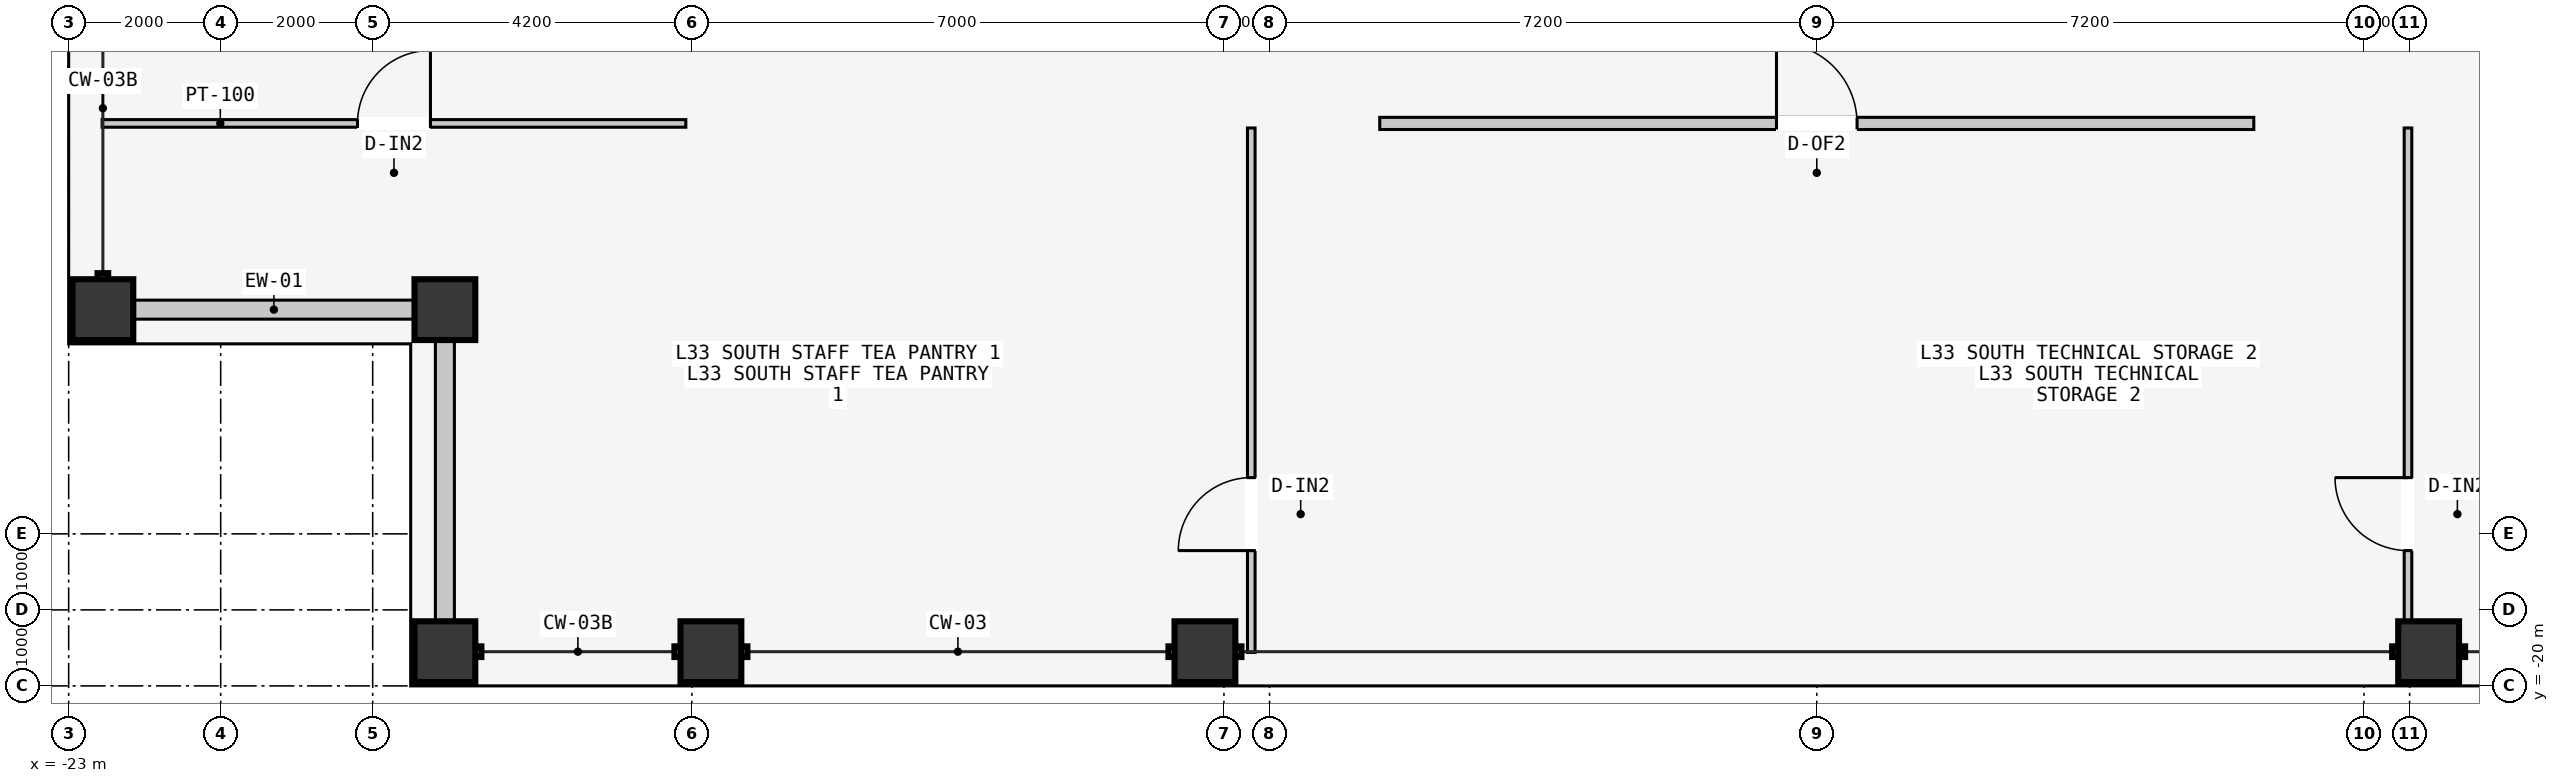
"""IFC4 building model, lengths in metres.
Left out: names, types, materials, properties, quantities, classifications, styles, units other than length and angle.
Written with IfcOpenShell. Run it as: python <this file> out.ifc"""

import sys

from ifc_helpers import new_model, si_unit, direction, frame, frame_2d, origin, origin_2d, place, context, subcontext, project, spatial, rectangle, hollow_rectangle, extrude, element, fill, save


model = new_model("IFC4")
c1 = context("Model", 3, precision=1e-05, world=origin(), true_north=direction((0.0, 1.0)))
c2 = subcontext(c1, "Body", "Model", "MODEL_VIEW")
j1 = project(units=[si_unit("LENGTHUNIT", "METRE"), si_unit("PLANEANGLEUNIT", "RADIAN")], contexts=[c1])
p1 = place(None, origin())
s1 = spatial("IfcSite", under=j1, at=p1, CompositionType="ELEMENT")
p2 = place(p1, origin())
s2 = spatial("IfcBuilding", under=s1, at=p2, CompositionType="ELEMENT")
p3 = place(p2, frame((0.0, 0.0, 127.8)))
s3 = spatial("IfcBuildingStorey", under=s2, at=p3, CompositionType="ELEMENT", Elevation=127.8)
for number, where, z_axis, x_axis in (
    (1, (-18.05, -19.55, 0.0), (0.0, 0.0, 1.0), (1.0, 0.0, 0.0)),
    (2, (-14.55, -19.55, 0.0), (0.0, 0.0, 1.0), (1.0, 0.0, 0.0)),
    (3, (-8.05, -19.55, 0.0), (0.0, 0.0, 1.0), (1.0, 0.0, 0.0)),
    (4, (8.05, -19.55, 0.0), (0.0, 0.0, 1.0), (1.0, 0.0, 0.0)),
    (5, (-22.55, -15.05, 0.0), (0.0, 0.0, 1.0), (0.0, 1.0, 0.0)),
    (6, (-18.05, -15.05, 0.0), (0.0, 0.0, 1.0), (1.0, 0.0, 0.0)),
):
    element("IfcColumn", number, at=place(p3, frame(where, z_axis=z_axis, x_axis=x_axis)), inside=s3, PredefinedType="COLUMN", context=c2, shape_type="SweptSolid", body=[
        extrude(hollow_rectangle(XDim=0.8, YDim=0.8, WallThickness=0.036, at=origin_2d()), origin(), (0.0, 0.0, 1.0), 3.6),
    ])
for number, where, z_axis, x_axis in (
    (7, (-22.14, -15.05, 0.0), (0.0, 0.0, 1.0), (1.0, 0.0, 0.0)),
    (8, (-18.05, -19.14, 0.0), (0.0, 0.0, 1.0), (0.0, 1.0, 0.0)),
):
    element("IfcWall", number, at=place(p3, frame(where, z_axis=z_axis, x_axis=x_axis)), inside=s3, PredefinedType="STANDARD", context=c2, shape_type="SweptSolid", body=[
        extrude(rectangle(XDim=3.68, YDim=0.25, at=frame_2d((1.84, 0.0))), origin(), (0.0, 0.0, 1.0), 2.75),
    ])
p4 = place(p3, frame((-7.44, -19.56, 0.0), z_axis=(0.0, 0.0, 1.0), x_axis=(0.0, 1.0, 0.0)))
e9 = element("IfcWall", 9, at=p4, inside=s3, PredefinedType="PARTITIONING", context=c2, shape_type="SweptSolid", body=[
    extrude(rectangle(XDim=6.9, YDim=0.1, at=frame_2d((3.45, 0.0))), origin(), (0.0, 0.0, 1.0), 3.4),
])
p5 = place(p4, frame((1.34, 0.0, 0.0)))
e10 = element("IfcOpeningElement", 10, at=p5, cuts=e9, PredefinedType="OPENING", context=c2, shape_type="SweptSolid", body=[
    extrude(rectangle(XDim=0.96, YDim=2.18, at=frame_2d((0.48, 1.09))), frame((0.0, 0.06, 0.0), z_axis=(0.0, -1.0, 0.0), x_axis=(1.0, 0.0, 0.0)), (0.0, 0.0, 1.0), 0.12),
])
p6 = place(p3, frame((7.779, -19.56, 0.0), z_axis=(0.0, 0.0, 1.0), x_axis=(0.0, 1.0, 0.0)))
e11 = element("IfcWall", 11, at=p6, inside=s3, PredefinedType="PARTITIONING", context=c2, shape_type="SweptSolid", body=[
    extrude(rectangle(XDim=6.9, YDim=0.1, at=frame_2d((3.45, 0.0))), origin(), (0.0, 0.0, 1.0), 3.4),
])
p7 = place(p6, frame((1.34, 0.0, 0.0)))
e12 = element("IfcOpeningElement", 12, at=p7, cuts=e11, PredefinedType="OPENING", context=c2, shape_type="SweptSolid", body=[
    extrude(rectangle(XDim=0.96, YDim=2.18, at=frame_2d((0.48, 1.09))), frame((0.0, 0.06, 0.0), z_axis=(0.0, -1.0, 0.0), x_axis=(1.0, 0.0, 0.0)), (0.0, 0.0, 1.0), 0.12),
])
p8 = place(p3, frame((-5.75, -12.6, 0.0), z_axis=(0.0, 0.0, 1.0), x_axis=(1.0, 0.0, 0.0)))
e13 = element("IfcWall", 13, at=p8, inside=s3, PredefinedType="PARTITIONING", context=c2, shape_type="SweptSolid", body=[
    extrude(rectangle(XDim=11.5, YDim=0.16, at=frame_2d((5.75, 0.0))), origin(), (0.0, 0.0, 1.0), 3.4),
])
p9 = place(p8, frame((5.22, 0.0, 0.0)))
e14 = element("IfcOpeningElement", 14, at=p9, cuts=e13, PredefinedType="OPENING", context=c2, shape_type="SweptSolid", body=[
    extrude(rectangle(XDim=1.06, YDim=2.2, at=frame_2d((0.53, 1.1))), frame((0.0, 0.09, 0.0), z_axis=(0.0, -1.0, 0.0), x_axis=(1.0, 0.0, 0.0)), (0.0, 0.0, 1.0), 0.18),
])
p10 = place(p3, frame((-22.56, -12.6, 0.0), z_axis=(0.0, 0.0, 1.0), x_axis=(1.0, 0.0, 0.0)))
e15 = element("IfcWall", 15, at=p10, inside=s3, PredefinedType="PARTITIONING", context=c2, shape_type="SweptSolid", body=[
    extrude(rectangle(XDim=7.68, YDim=0.1, at=frame_2d((3.84, 0.0))), origin(), (0.0, 0.0, 1.0), 3.4),
])
p11 = place(p10, frame((3.36, 0.0, 0.0)))
e16 = element("IfcOpeningElement", 16, at=p11, cuts=e15, PredefinedType="OPENING", context=c2, shape_type="SweptSolid", body=[
    extrude(rectangle(XDim=0.96, YDim=2.18, at=frame_2d((0.48, 1.09))), frame((0.0, 0.06, 0.0), z_axis=(0.0, -1.0, 0.0), x_axis=(1.0, 0.0, 0.0)), (0.0, 0.0, 1.0), 0.12),
])
p12 = place(p5, origin())
e17 = element("IfcDoor", 17, at=p12, inside=s3, OperationType="SINGLE_SWING_LEFT", PredefinedType="DOOR", context=c2, shape_type="SweptSolid", body=[
    extrude(rectangle(XDim=0.96, YDim=2.18, at=frame_2d((0.48, 1.09))), frame((0.0, 0.025, 0.0), z_axis=(0.0, -1.0, 0.0), x_axis=(1.0, 0.0, 0.0)), (0.0, 0.0, 1.0), 0.05),
])
fill(e10, e17)
p13 = place(p7, origin())
e18 = element("IfcDoor", 18, at=p13, inside=s3, OperationType="SINGLE_SWING_RIGHT", PredefinedType="DOOR", context=c2, shape_type="SweptSolid", body=[
    extrude(rectangle(XDim=0.96, YDim=2.18, at=frame_2d((0.48, 1.09))), frame((0.0, 0.025, 0.0), z_axis=(0.0, -1.0, 0.0), x_axis=(1.0, 0.0, 0.0)), (0.0, 0.0, 1.0), 0.05),
])
fill(e12, e18)
p14 = place(p9, origin())
e19 = element("IfcDoor", 19, at=p14, inside=s3, OperationType="SINGLE_SWING_LEFT", PredefinedType="DOOR", context=c2, shape_type="SweptSolid", body=[
    extrude(rectangle(XDim=1.06, YDim=2.2, at=frame_2d((0.53, 1.1))), frame((0.0, 0.025, 0.0), z_axis=(0.0, -1.0, 0.0), x_axis=(1.0, 0.0, 0.0)), (0.0, 0.0, 1.0), 0.05),
])
fill(e14, e19)
p15 = place(p11, origin())
e20 = element("IfcDoor", 20, at=p15, inside=s3, OperationType="SINGLE_SWING_RIGHT", PredefinedType="DOOR", context=c2, shape_type="SweptSolid", body=[
    extrude(rectangle(XDim=0.96, YDim=2.18, at=frame_2d((0.48, 1.09))), frame((0.0, 0.025, 0.0), z_axis=(0.0, -1.0, 0.0), x_axis=(1.0, 0.0, 0.0)), (0.0, 0.0, 1.0), 0.05),
])
fill(e16, e20)
save(model, sys.argv[1])
